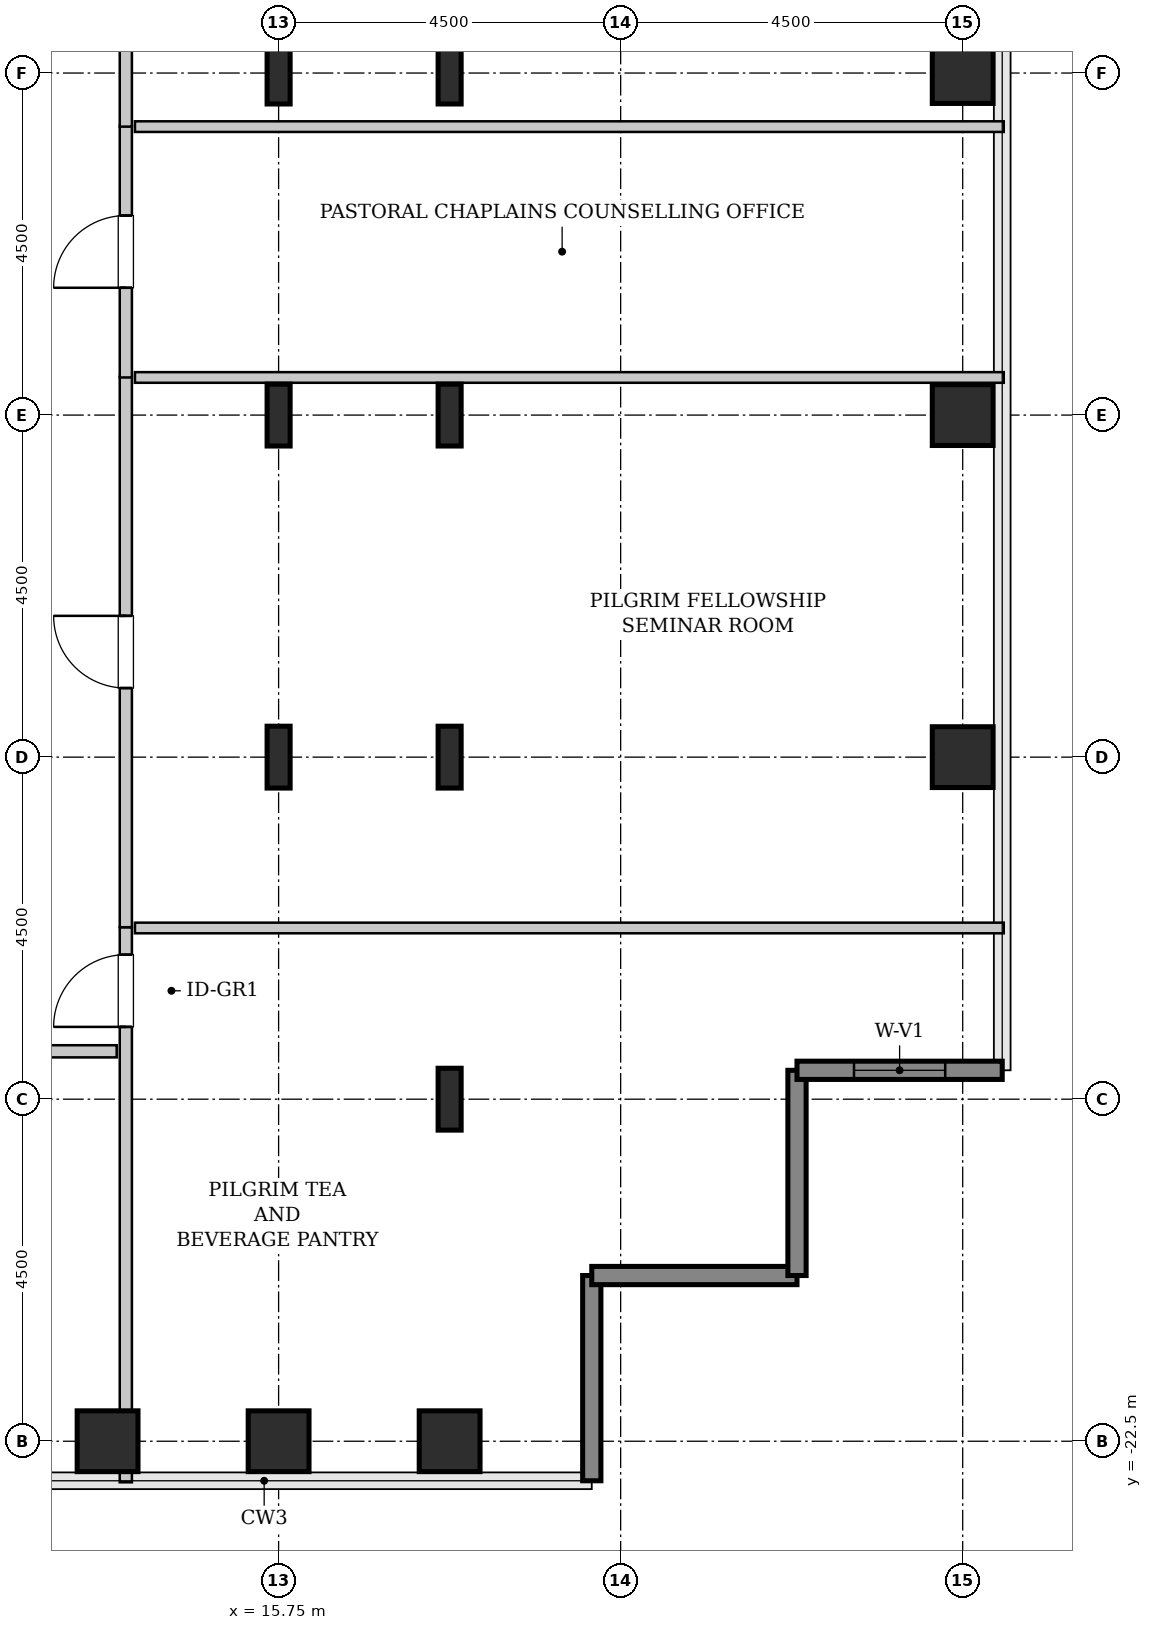
"""IFC4 building model, lengths in metres.
Left out: names, types, materials, properties, quantities, classifications, styles, units other than length and angle.
Written with IfcOpenShell. Run it as: python <this file> out.ifc"""

import sys

from ifc_helpers import new_model, si_unit, direction, frame, frame_2d, origin, origin_2d, place, context, subcontext, project, spatial, rectangle, hollow_rectangle, i_section, extrude, source, transform, mapped, element, fill, save


model = new_model("IFC4")
c1 = context("Model", 3, precision=1e-05, world=origin(), true_north=direction((0.0, 1.0)))
c2 = subcontext(c1, "Body", "Model", "MODEL_VIEW")
j1 = project(units=[si_unit("LENGTHUNIT", "METRE"), si_unit("PLANEANGLEUNIT", "RADIAN")], contexts=[c1])
p1 = place(None, origin())
s1 = spatial("IfcSite", under=j1, at=p1, CompositionType="ELEMENT")
p2 = place(p1, origin())
s2 = spatial("IfcBuilding", under=s1, at=p2, CompositionType="ELEMENT")
p3 = place(p2, frame((0.0, 0.0, 179.2)))
s3 = spatial("IfcBuildingStorey", under=s2, at=p3, CompositionType="ELEMENT", Elevation=179.2)
m1 = source(origin(), c2, "Body", "SweptSolid", [
    extrude(hollow_rectangle(XDim=0.8, YDim=0.8, WallThickness=0.04, InnerFilletRadius=0.04, OuterFilletRadius=0.08, at=origin_2d()), origin(), (0.0, 0.0, 1.0), 3.8),
])
for number, where, z_axis, x_axis in (
    (1, (13.5, -22.5, 0.0), (0.0, 0.0, 1.0), (1.0, 0.0, 0.0)),
    (2, (15.75, -22.5, 0.0), (0.0, 0.0, 1.0), (1.0, 0.0, 0.0)),
):
    element("IfcColumn", number, at=place(p3, frame(where, z_axis=z_axis, x_axis=x_axis)), inside=s3, PredefinedType="COLUMN", context=c2, shape_type="MappedRepresentation", body=[
        mapped(m1, transform((0.0, 0.0, 0.0), x_axis=(1.0, 0.0, 0.0), y_axis=(0.0, 1.0, 0.0), z_axis=(0.0, 0.0, 1.0), scale=1.0)),
    ])
m2 = source(origin(), c2, "Body", "SweptSolid", [
    extrude(i_section(OverallWidth=0.303, OverallDepth=0.814, WebThickness=0.021, FlangeThickness=0.04, FilletRadius=0.03, at=origin_2d()), origin(), (0.0, 0.0, 1.0), 3.8),
])
for number, where, z_axis, x_axis in (
    (3, (15.75, -13.5, 0.0), (0.0, 0.0, 1.0), (1.0, 0.0, 0.0)),
    (4, (15.75, -9.0, 0.0), (0.0, 0.0, 1.0), (1.0, 0.0, 0.0)),
    (5, (15.75, -4.5, 0.0), (0.0, 0.0, 1.0), (1.0, 0.0, 0.0)),
):
    element("IfcColumn", number, at=place(p3, frame(where, z_axis=z_axis, x_axis=x_axis)), inside=s3, PredefinedType="COLUMN", context=c2, shape_type="MappedRepresentation", body=[
        mapped(m2, transform((0.0, 0.0, 0.0), x_axis=(1.0, 0.0, 0.0), y_axis=(0.0, 1.0, 0.0), z_axis=(0.0, 0.0, 1.0), scale=1.0)),
    ])
p4 = place(p3, frame((18.0, -22.5, 0.0), z_axis=(0.0, 0.0, 1.0), x_axis=(1.0, 0.0, 0.0)))
e6 = element("IfcColumn", 6, at=p4, inside=s3, PredefinedType="COLUMN", context=c2, shape_type="MappedRepresentation", body=[
    mapped(m1, transform((0.0, 0.0, 0.0), x_axis=(1.0, 0.0, 0.0), y_axis=(0.0, 1.0, 0.0), z_axis=(0.0, 0.0, 1.0), scale=1.0)),
])
for number, where, z_axis, x_axis in (
    (7, (18.0, -18.0, 0.0), (0.0, 0.0, 1.0), (1.0, 0.0, 0.0)),
    (8, (18.0, -13.5, 0.0), (0.0, 0.0, 1.0), (1.0, 0.0, 0.0)),
    (9, (18.0, -9.0, 0.0), (0.0, 0.0, 1.0), (1.0, 0.0, 0.0)),
    (10, (18.0, -4.5, 0.0), (0.0, 0.0, 1.0), (1.0, 0.0, 0.0)),
):
    element("IfcColumn", number, at=place(p3, frame(where, z_axis=z_axis, x_axis=x_axis)), inside=s3, PredefinedType="COLUMN", context=c2, shape_type="MappedRepresentation", body=[
        mapped(m2, transform((0.0, 0.0, 0.0), x_axis=(1.0, 0.0, 0.0), y_axis=(0.0, 1.0, 0.0), z_axis=(0.0, 0.0, 1.0), scale=1.0)),
    ])
for number, where, z_axis, x_axis in (
    (11, (24.75, -13.5, 0.0), (0.0, 0.0, 1.0), (1.0, 0.0, 0.0)),
    (12, (24.75, -9.0, 0.0), (0.0, 0.0, 1.0), (1.0, 0.0, 0.0)),
    (13, (24.75, -4.5, 0.0), (0.0, 0.0, 1.0), (1.0, 0.0, 0.0)),
):
    element("IfcColumn", number, at=place(p3, frame(where, z_axis=z_axis, x_axis=x_axis)), inside=s3, PredefinedType="COLUMN", context=c2, shape_type="MappedRepresentation", body=[
        mapped(m1, transform((0.0, 0.0, 0.0), x_axis=(1.0, 0.0, 0.0), y_axis=(0.0, 1.0, 0.0), z_axis=(0.0, 0.0, 1.0), scale=1.0)),
    ])
m3 = source(origin(), c2, "Body", "SweptSolid", [
    extrude(rectangle(XDim=2.7, YDim=0.24, at=frame_2d((1.35, 0.0))), origin(), (0.0, 0.0, 1.0), 3.55),
])
for number, where, z_axis, x_axis in (
    (14, (19.87, -23.02, 0.0), (0.0, 0.0, 1.0), (0.0, 1.0, 0.0)),
    (15, (19.87, -20.32, 0.0), (0.0, 0.0, 1.0), (1.0, 0.0, 0.0)),
    (16, (22.57, -20.32, 0.0), (0.0, 0.0, 1.0), (0.0, 1.0, 0.0)),
):
    element("IfcWall", number, at=place(p3, frame(where, z_axis=z_axis, x_axis=x_axis)), inside=s3, PredefinedType="SHEAR", context=c2, shape_type="MappedRepresentation", body=[
        mapped(m3, transform((0.0, 0.0, 0.0), x_axis=(1.0, 0.0, 0.0), y_axis=(0.0, 1.0, 0.0), z_axis=(0.0, 0.0, 1.0), scale=1.0)),
    ])
p5 = place(p3, frame((22.57, -17.62, 0.0), z_axis=(0.0, 0.0, 1.0), x_axis=(1.0, 0.0, 0.0)))
e17 = element("IfcWall", 17, at=p5, inside=s3, PredefinedType="SHEAR", context=c2, shape_type="MappedRepresentation", body=[
    mapped(m3, transform((0.0, 0.0, 0.0), x_axis=(1.0, 0.0, 0.0), y_axis=(0.0, 1.0, 0.0), z_axis=(0.0, 0.0, 1.0), scale=1.0)),
])
p6 = place(p5, frame((0.75, 0.0, 0.85)))
e18 = element("IfcOpeningElement", 18, at=p6, cuts=e17, PredefinedType="OPENING", context=c2, shape_type="SweptSolid", body=[
    extrude(rectangle(XDim=1.2, YDim=1.8, at=frame_2d((0.6, 0.9))), frame((0.0, 0.13, 0.0), z_axis=(0.0, -1.0, 0.0), x_axis=(1.0, 0.0, 0.0)), (0.0, 0.0, 1.0), 0.26),
])
m4 = source(origin(), c2, "Body", "SweptSolid", [
    extrude(rectangle(XDim=7.302, YDim=0.16, at=frame_2d((3.651, 0.0))), origin(), (0.0, 0.0, 1.0), 3.535),
])
p7 = place(p3, frame((13.74, -23.04, 0.0), z_axis=(0.0, 0.0, 1.0), x_axis=(0.0, 1.0, 0.0)))
e19 = element("IfcWall", 19, at=p7, inside=s3, PredefinedType="PARTITIONING", context=c2, shape_type="MappedRepresentation", body=[
    mapped(m4, transform((0.0, 0.0, 0.0), x_axis=(1.0, 0.0, 0.0), y_axis=(0.0, 1.0, 0.0), z_axis=(0.0, 0.0, 1.0), scale=1.0)),
])
p8 = place(p7, frame((5.991, 0.0, 0.0)))
e20 = element("IfcOpeningElement", 20, at=p8, cuts=e19, PredefinedType="OPENING", context=c2, shape_type="SweptSolid", body=[
    extrude(rectangle(XDim=0.95, YDim=2.1, at=frame_2d((0.475, 1.05))), frame((0.0, 0.09, 0.0), z_axis=(0.0, -1.0, 0.0), x_axis=(1.0, 0.0, 0.0)), (0.0, 0.0, 1.0), 0.18),
])
m5 = source(origin(), c2, "Body", "SweptSolid", [
    extrude(rectangle(XDim=11.43, YDim=0.14, at=frame_2d((5.715, 0.0))), origin(), (0.0, 0.0, 1.0), 3.535),
])
p9 = place(p3, frame((13.86, -15.748, 0.0), z_axis=(0.0, 0.0, 1.0), x_axis=(1.0, 0.0, 0.0)))
e21 = element("IfcWall", 21, at=p9, inside=s3, PredefinedType="PARTITIONING", context=c2, shape_type="MappedRepresentation", body=[
    mapped(m5, transform((0.0, 0.0, 0.0), x_axis=(1.0, 0.0, 0.0), y_axis=(0.0, 1.0, 0.0), z_axis=(0.0, 0.0, 1.0), scale=1.0)),
])
m6 = source(origin(), c2, "Body", "SweptSolid", [
    extrude(rectangle(XDim=7.242, YDim=0.16, at=frame_2d((3.621, 0.0))), origin(), (0.0, 0.0, 1.0), 3.535),
])
p10 = place(p3, frame((13.74, -15.738, 0.0), z_axis=(0.0, 0.0, 1.0), x_axis=(0.0, 1.0, 0.0)))
e22 = element("IfcWall", 22, at=p10, inside=s3, PredefinedType="PARTITIONING", context=c2, shape_type="MappedRepresentation", body=[
    mapped(m6, transform((0.0, 0.0, 0.0), x_axis=(1.0, 0.0, 0.0), y_axis=(0.0, 1.0, 0.0), z_axis=(0.0, 0.0, 1.0), scale=1.0)),
])
p11 = place(p10, frame((3.146, 0.0, 0.0)))
e23 = element("IfcOpeningElement", 23, at=p11, cuts=e22, PredefinedType="OPENING", context=c2, shape_type="SweptSolid", body=[
    extrude(rectangle(XDim=0.95, YDim=2.1, at=frame_2d((0.475, 1.05))), frame((0.0, 0.09, 0.0), z_axis=(0.0, -1.0, 0.0), x_axis=(1.0, 0.0, 0.0)), (0.0, 0.0, 1.0), 0.18),
])
m7 = source(origin(), c2, "Body", "SweptSolid", [
    extrude(rectangle(XDim=11.43, YDim=0.14, at=frame_2d((5.715, 0.0))), origin(), (0.0, 0.0, 1.0), 2.875),
])
p12 = place(p3, frame((13.86, -8.505, 0.0), z_axis=(0.0, 0.0, 1.0), x_axis=(1.0, 0.0, 0.0)))
e24 = element("IfcWall", 24, at=p12, inside=s3, PredefinedType="PARTITIONING", context=c2, shape_type="MappedRepresentation", body=[
    mapped(m7, transform((0.0, 0.0, 0.0), x_axis=(1.0, 0.0, 0.0), y_axis=(0.0, 1.0, 0.0), z_axis=(0.0, 0.0, 1.0), scale=1.0)),
])
m8 = source(origin(), c2, "Body", "SweptSolid", [
    extrude(rectangle(XDim=3.31, YDim=0.16, at=frame_2d((1.655, 0.0))), origin(), (0.0, 0.0, 1.0), 3.535),
])
p13 = place(p3, frame((13.74, -8.505, 0.0), z_axis=(0.0, 0.0, 1.0), x_axis=(0.0, 1.0, 0.0)))
e25 = element("IfcWall", 25, at=p13, inside=s3, PredefinedType="PARTITIONING", context=c2, shape_type="MappedRepresentation", body=[
    mapped(m8, transform((0.0, 0.0, 0.0), x_axis=(1.0, 0.0, 0.0), y_axis=(0.0, 1.0, 0.0), z_axis=(0.0, 0.0, 1.0), scale=1.0)),
])
p14 = place(p13, frame((1.18, 0.0, 0.0)))
e26 = element("IfcOpeningElement", 26, at=p14, cuts=e25, PredefinedType="OPENING", context=c2, shape_type="SweptSolid", body=[
    extrude(rectangle(XDim=0.95, YDim=2.1, at=frame_2d((0.475, 1.05))), frame((0.0, 0.09, 0.0), z_axis=(0.0, -1.0, 0.0), x_axis=(1.0, 0.0, 0.0)), (0.0, 0.0, 1.0), 0.18),
])
p15 = place(p3, frame((13.86, -5.205, 0.0), z_axis=(0.0, 0.0, 1.0), x_axis=(1.0, 0.0, 0.0)))
e27 = element("IfcWall", 27, at=p15, inside=s3, PredefinedType="PARTITIONING", context=c2, shape_type="MappedRepresentation", body=[
    mapped(m5, transform((0.0, 0.0, 0.0), x_axis=(1.0, 0.0, 0.0), y_axis=(0.0, 1.0, 0.0), z_axis=(0.0, 0.0, 1.0), scale=1.0)),
])
m9 = source(origin(), c2, "Body", "SweptSolid", [
    extrude(rectangle(XDim=5.01, YDim=0.16, at=frame_2d((2.505, 0.0))), origin(), (0.0, 0.0, 1.0), 3.535),
])
p16 = place(p3, frame((13.74, -5.205, 0.0), z_axis=(0.0, 0.0, 1.0), x_axis=(0.0, 1.0, 0.0)))
e28 = element("IfcWall", 28, at=p16, inside=s3, PredefinedType="PARTITIONING", context=c2, shape_type="MappedRepresentation", body=[
    mapped(m9, transform((0.0, 0.0, 0.0), x_axis=(1.0, 0.0, 0.0), y_axis=(0.0, 1.0, 0.0), z_axis=(0.0, 0.0, 1.0), scale=1.0)),
])
p17 = place(p16, frame((2.03, 0.0, 0.0)))
e29 = element("IfcOpeningElement", 29, at=p17, cuts=e28, PredefinedType="OPENING", context=c2, shape_type="SweptSolid", body=[
    extrude(rectangle(XDim=0.95, YDim=2.1, at=frame_2d((0.475, 1.05))), frame((0.0, 0.09, 0.0), z_axis=(0.0, -1.0, 0.0), x_axis=(1.0, 0.0, 0.0)), (0.0, 0.0, 1.0), 0.18),
])
m10 = source(origin(), c2, "Body", "SweptSolid", [
    extrude(rectangle(XDim=5.825, YDim=0.16, at=frame_2d((2.913, 0.0))), origin(), (0.0, 0.0, 1.0), 3.535),
])
p18 = place(p3, frame((7.795, -17.37, 0.0), z_axis=(0.0, 0.0, 1.0), x_axis=(1.0, 0.0, 0.0)))
e30 = element("IfcWall", 30, at=p18, inside=s3, PredefinedType="PARTITIONING", context=c2, shape_type="MappedRepresentation", body=[
    mapped(m10, transform((0.0, 0.0, 0.0), x_axis=(1.0, 0.0, 0.0), y_axis=(0.0, 1.0, 0.0), z_axis=(0.0, 0.0, 1.0), scale=1.0)),
])
p19 = place(p18, frame((2.092, 0.0, 0.0)))
e31 = element("IfcOpeningElement", 31, at=p19, cuts=e30, PredefinedType="OPENING", context=c2, shape_type="SweptSolid", body=[
    extrude(rectangle(XDim=0.95, YDim=2.1, at=frame_2d((0.475, 1.05))), frame((0.0, 0.09, 0.0), z_axis=(0.0, -1.0, 0.0), x_axis=(1.0, 0.0, 0.0)), (0.0, 0.0, 1.0), 0.18),
])
m11 = source(origin(), c2, "Body", "SweptSolid", [
    extrude(rectangle(XDim=1.2, YDim=1.8, at=frame_2d((0.6, 0.9))), frame((0.0, 0.03, 0.0), z_axis=(0.0, -1.0, 0.0), x_axis=(1.0, 0.0, 0.0)), (0.0, 0.0, 1.0), 0.06),
])
p20 = place(p6, origin())
e32 = element("IfcWindow", 32, at=p20, inside=s3, PartitioningType="SINGLE_PANEL", PredefinedType="WINDOW", context=c2, shape_type="MappedRepresentation", body=[
    mapped(m11, transform((0.0, 0.0, 0.0), x_axis=(1.0, 0.0, 0.0), y_axis=(0.0, 1.0, 0.0), z_axis=(0.0, 0.0, 1.0), scale=1.0)),
])
fill(e18, e32)
m12 = source(origin(), c2, "Body", "SweptSolid", [
    extrude(rectangle(XDim=0.95, YDim=2.1, at=frame_2d((0.475, 1.05))), frame((0.0, 0.025, 0.0), z_axis=(0.0, -1.0, 0.0), x_axis=(1.0, 0.0, 0.0)), (0.0, 0.0, 1.0), 0.05),
])
p21 = place(p8, origin())
e33 = element("IfcDoor", 33, at=p21, inside=s3, OperationType="SINGLE_SWING_LEFT", PredefinedType="DOOR", context=c2, shape_type="MappedRepresentation", body=[
    mapped(m12, transform((0.0, 0.0, 0.0), x_axis=(1.0, 0.0, 0.0), y_axis=(0.0, 1.0, 0.0), z_axis=(0.0, 0.0, 1.0), scale=1.0)),
])
fill(e20, e33)
p22 = place(p11, origin())
e34 = element("IfcDoor", 34, at=p22, inside=s3, OperationType="SINGLE_SWING_RIGHT", PredefinedType="DOOR", context=c2, shape_type="MappedRepresentation", body=[
    mapped(m12, transform((0.0, 0.0, 0.0), x_axis=(1.0, 0.0, 0.0), y_axis=(0.0, 1.0, 0.0), z_axis=(0.0, 0.0, 1.0), scale=1.0)),
])
fill(e23, e34)
p23 = place(p14, origin())
e35 = element("IfcDoor", 35, at=p23, inside=s3, OperationType="SINGLE_SWING_LEFT", PredefinedType="DOOR", context=c2, shape_type="MappedRepresentation", body=[
    mapped(m12, transform((0.0, 0.0, 0.0), x_axis=(1.0, 0.0, 0.0), y_axis=(0.0, 1.0, 0.0), z_axis=(0.0, 0.0, 1.0), scale=1.0)),
])
fill(e26, e35)
save(model, sys.argv[1])
